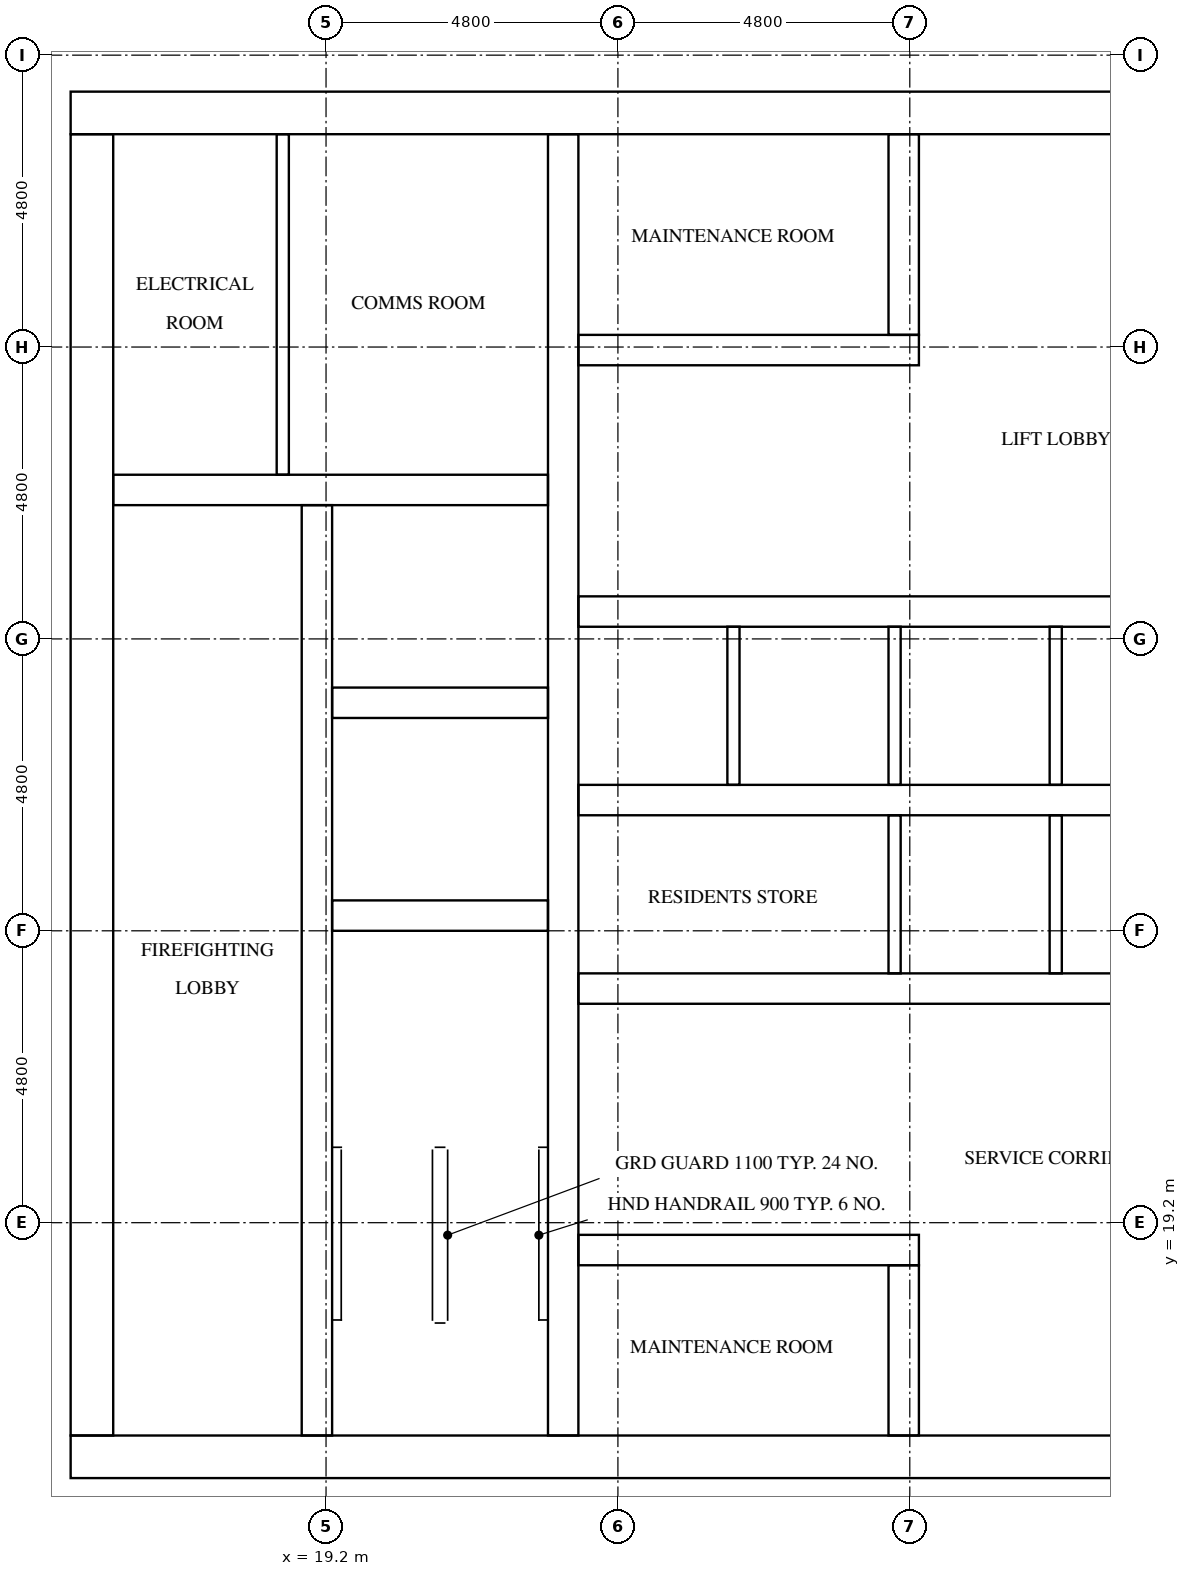
"""IFC4 building model, lengths in metres.
Left out: names, types, materials, properties, quantities, classifications, styles, units other than length and angle.
Written with IfcOpenShell. Run it as: python <this file> out.ifc"""

import sys

from ifc_helpers import new_model, si_unit, direction, frame, frame_2d, origin, place, context, subcontext, project, spatial, rectangle, extrude, element, fill, save


model = new_model("IFC4")
c1 = context("Model", 3, precision=1e-05, world=origin(), true_north=direction((0.0, 1.0)))
c2 = subcontext(c1, "Body", "Model", "MODEL_VIEW")
j1 = project(units=[si_unit("LENGTHUNIT", "METRE"), si_unit("PLANEANGLEUNIT", "RADIAN")], contexts=[c1])
p1 = place(None, origin())
s1 = spatial("IfcSite", under=j1, at=p1, CompositionType="ELEMENT")
p2 = place(p1, origin())
s2 = spatial("IfcBuilding", under=s1, at=p2, CompositionType="ELEMENT")
p3 = place(p2, frame((0.0, 0.0, 219.3)))
s3 = spatial("IfcBuildingStorey", under=s2, at=p3, CompositionType="ELEMENT", Elevation=219.3)
p4 = place(p3, frame((15.0, 15.35, 0.0), z_axis=(0.0, 0.0, 1.0), x_axis=(1.0, 0.0, 0.0)))
e1 = element("IfcWall", 1, at=p4, inside=s3, PredefinedType="SHEAR", context=c2, shape_type="SweptSolid", body=[
    extrude(rectangle(XDim=32.4, YDim=0.7, at=frame_2d((16.2, 0.0))), origin(), (0.0, 0.0, 1.0), 3.2),
])
p5 = place(p4, frame((15.3, 0.0, 0.0)))
e2 = element("IfcOpeningElement", 2, at=p5, cuts=e1, PredefinedType="OPENING", context=c2, shape_type="SweptSolid", body=[
    extrude(rectangle(XDim=1.8, YDim=2.1, at=frame_2d((0.9, 1.05))), frame((0.0, 0.36, 0.0), z_axis=(0.0, -1.0, 0.0), x_axis=(1.0, 0.0, 0.0)), (0.0, 0.0, 1.0), 0.72),
])
p6 = place(p3, frame((15.0, 37.45, 0.0), z_axis=(0.0, 0.0, 1.0), x_axis=(1.0, 0.0, 0.0)))
e3 = element("IfcWall", 3, at=p6, inside=s3, PredefinedType="SHEAR", context=c2, shape_type="SweptSolid", body=[
    extrude(rectangle(XDim=32.4, YDim=0.7, at=frame_2d((16.2, 0.0))), origin(), (0.0, 0.0, 1.0), 3.2),
])
p7 = place(p6, frame((15.3, 0.0, 0.0)))
e4 = element("IfcOpeningElement", 4, at=p7, cuts=e3, PredefinedType="OPENING", context=c2, shape_type="SweptSolid", body=[
    extrude(rectangle(XDim=1.8, YDim=2.1, at=frame_2d((0.9, 1.05))), frame((0.0, 0.36, 0.0), z_axis=(0.0, -1.0, 0.0), x_axis=(1.0, 0.0, 0.0)), (0.0, 0.0, 1.0), 0.72),
])
p8 = place(p6, frame((1.544, 0.0, 0.0)))
e5 = element("IfcOpeningElement", 5, at=p8, cuts=e3, PredefinedType="OPENING", context=c2, shape_type="SweptSolid", body=[
    extrude(rectangle(XDim=1.0, YDim=2.1, at=frame_2d((0.5, 1.05))), frame((0.0, 0.36, 0.0), z_axis=(0.0, -1.0, 0.0), x_axis=(1.0, 0.0, 0.0)), (0.0, 0.0, 1.0), 0.72),
])
p9 = place(p6, frame((5.219, 0.0, 0.0)))
e6 = element("IfcOpeningElement", 6, at=p9, cuts=e3, PredefinedType="OPENING", context=c2, shape_type="SweptSolid", body=[
    extrude(rectangle(XDim=1.0, YDim=2.1, at=frame_2d((0.5, 1.05))), frame((0.0, 0.36, 0.0), z_axis=(0.0, -1.0, 0.0), x_axis=(1.0, 0.0, 0.0)), (0.0, 0.0, 1.0), 0.72),
])
p10 = place(p3, frame((15.35, 15.7, 0.0), z_axis=(0.0, 0.0, 1.0), x_axis=(0.0, 1.0, 0.0)))
e7 = element("IfcWall", 7, at=p10, inside=s3, PredefinedType="SHEAR", context=c2, shape_type="SweptSolid", body=[
    extrude(rectangle(XDim=21.4, YDim=0.7, at=frame_2d((10.7, 0.0))), origin(), (0.0, 0.0, 1.0), 3.2),
])
p11 = place(p10, frame((5.06, 0.0, 0.0)))
e8 = element("IfcOpeningElement", 8, at=p11, cuts=e7, PredefinedType="OPENING", context=c2, shape_type="SweptSolid", body=[
    extrude(rectangle(XDim=1.2, YDim=2.1, at=frame_2d((0.6, 1.05))), frame((0.0, 0.36, 0.0), z_axis=(0.0, -1.0, 0.0), x_axis=(1.0, 0.0, 0.0)), (0.0, 0.0, 1.0), 0.72),
])
p12 = place(p3, frame((19.05, 15.7, 0.0), z_axis=(0.0, 0.0, 1.0), x_axis=(0.0, 1.0, 0.0)))
e9 = element("IfcWall", 9, at=p12, inside=s3, PredefinedType="SHEAR", context=c2, shape_type="SweptSolid", body=[
    extrude(rectangle(XDim=15.3, YDim=0.5, at=frame_2d((7.65, 0.0))), origin(), (0.0, 0.0, 1.0), 3.2),
])
p13 = place(p12, frame((9.75, 0.0, 0.0)))
e10 = element("IfcOpeningElement", 10, at=p13, cuts=e9, PredefinedType="OPENING", context=c2, shape_type="SweptSolid", body=[
    extrude(rectangle(XDim=1.1, YDim=2.1, at=frame_2d((0.55, 1.05))), frame((0.0, 0.26, 0.0), z_axis=(0.0, -1.0, 0.0), x_axis=(1.0, 0.0, 0.0)), (0.0, 0.0, 1.0), 0.52),
])
p14 = place(p12, frame((13.25, 0.0, 0.0)))
e11 = element("IfcOpeningElement", 11, at=p14, cuts=e9, PredefinedType="OPENING", context=c2, shape_type="SweptSolid", body=[
    extrude(rectangle(XDim=1.1, YDim=2.1, at=frame_2d((0.55, 1.05))), frame((0.0, 0.26, 0.0), z_axis=(0.0, -1.0, 0.0), x_axis=(1.0, 0.0, 0.0)), (0.0, 0.0, 1.0), 0.52),
])
p15 = place(p12, frame((0.5, 0.0, 0.0)))
e12 = element("IfcOpeningElement", 12, at=p15, cuts=e9, PredefinedType="OPENING", context=c2, shape_type="SweptSolid", body=[
    extrude(rectangle(XDim=1.2, YDim=2.1, at=frame_2d((0.6, 1.05))), frame((0.0, 0.26, 0.0), z_axis=(0.0, -1.0, 0.0), x_axis=(1.0, 0.0, 0.0)), (0.0, 0.0, 1.0), 0.52),
])
p16 = place(p3, frame((23.1, 15.7, 0.0), z_axis=(0.0, 0.0, 1.0), x_axis=(0.0, 1.0, 0.0)))
e13 = element("IfcWall", 13, at=p16, inside=s3, PredefinedType="SHEAR", context=c2, shape_type="SweptSolid", body=[
    extrude(rectangle(XDim=21.4, YDim=0.5, at=frame_2d((10.7, 0.0))), origin(), (0.0, 0.0, 1.0), 3.2),
])
for number, where, z_axis, x_axis in (
    (14, (19.3, 24.25, 0.0), (0.0, 0.0, 1.0), (1.0, 0.0, 0.0)),
    (15, (19.3, 27.75, 0.0), (0.0, 0.0, 1.0), (1.0, 0.0, 0.0)),
):
    element("IfcWall", number, at=place(p3, frame(where, z_axis=z_axis, x_axis=x_axis)), inside=s3, PredefinedType="SHEAR", context=c2, shape_type="SweptSolid", body=[
        extrude(rectangle(XDim=3.55, YDim=0.5, at=frame_2d((1.775, 0.0))), origin(), (0.0, 0.0, 1.0), 3.2),
    ])
p17 = place(p3, frame((15.7, 31.25, 0.0), z_axis=(0.0, 0.0, 1.0), x_axis=(1.0, 0.0, 0.0)))
e16 = element("IfcWall", 16, at=p17, inside=s3, PredefinedType="SHEAR", context=c2, shape_type="SweptSolid", body=[
    extrude(rectangle(XDim=7.15, YDim=0.5, at=frame_2d((3.575, 0.0))), origin(), (0.0, 0.0, 1.0), 3.2),
])
p18 = place(p3, frame((23.35, 18.75, 0.0), z_axis=(0.0, 0.0, 1.0), x_axis=(1.0, 0.0, 0.0)))
e17 = element("IfcWall", 17, at=p18, inside=s3, PredefinedType="SHEAR", context=c2, shape_type="SweptSolid", body=[
    extrude(rectangle(XDim=5.6, YDim=0.5, at=frame_2d((2.8, 0.0))), origin(), (0.0, 0.0, 1.0), 3.2),
])
p19 = place(p18, frame((2.05, 0.0, 0.0)))
e18 = element("IfcOpeningElement", 18, at=p19, cuts=e17, PredefinedType="OPENING", context=c2, shape_type="SweptSolid", body=[
    extrude(rectangle(XDim=1.0, YDim=2.1, at=frame_2d((0.5, 1.05))), frame((0.0, 0.26, 0.0), z_axis=(0.0, -1.0, 0.0), x_axis=(1.0, 0.0, 0.0)), (0.0, 0.0, 1.0), 0.52),
])
p20 = place(p3, frame((23.35, 23.05, 0.0), z_axis=(0.0, 0.0, 1.0), x_axis=(1.0, 0.0, 0.0)))
e19 = element("IfcWall", 19, at=p20, inside=s3, PredefinedType="SHEAR", context=c2, shape_type="SweptSolid", body=[
    extrude(rectangle(XDim=15.7, YDim=0.5, at=frame_2d((7.85, 0.0))), origin(), (0.0, 0.0, 1.0), 3.2),
])
p21 = place(p20, frame((2.05, 0.0, 0.0)))
e20 = element("IfcOpeningElement", 20, at=p21, cuts=e19, PredefinedType="OPENING", context=c2, shape_type="SweptSolid", body=[
    extrude(rectangle(XDim=1.0, YDim=2.1, at=frame_2d((0.5, 1.05))), frame((0.0, 0.26, 0.0), z_axis=(0.0, -1.0, 0.0), x_axis=(1.0, 0.0, 0.0)), (0.0, 0.0, 1.0), 0.52),
])
p22 = place(p20, frame((12.65, 0.0, 0.0)))
e21 = element("IfcOpeningElement", 21, at=p22, cuts=e19, PredefinedType="OPENING", context=c2, shape_type="SweptSolid", body=[
    extrude(rectangle(XDim=1.0, YDim=2.1, at=frame_2d((0.5, 1.05))), frame((0.0, 0.26, 0.0), z_axis=(0.0, -1.0, 0.0), x_axis=(1.0, 0.0, 0.0)), (0.0, 0.0, 1.0), 0.52),
])
p23 = place(p3, frame((23.35, 26.15, 0.0), z_axis=(0.0, 0.0, 1.0), x_axis=(1.0, 0.0, 0.0)))
e22 = element("IfcWall", 22, at=p23, inside=s3, PredefinedType="SHEAR", context=c2, shape_type="SweptSolid", body=[
    extrude(rectangle(XDim=15.7, YDim=0.5, at=frame_2d((7.85, 0.0))), origin(), (0.0, 0.0, 1.0), 3.2),
])
p24 = place(p3, frame((23.35, 29.25, 0.0), z_axis=(0.0, 0.0, 1.0), x_axis=(1.0, 0.0, 0.0)))
e23 = element("IfcWall", 23, at=p24, inside=s3, PredefinedType="SHEAR", context=c2, shape_type="SweptSolid", body=[
    extrude(rectangle(XDim=15.7, YDim=0.5, at=frame_2d((7.85, 0.0))), origin(), (0.0, 0.0, 1.0), 3.2),
])
p25 = place(p24, frame((0.675, 0.0, 0.0)))
e24 = element("IfcOpeningElement", 24, at=p25, cuts=e23, PredefinedType="OPENING", context=c2, shape_type="SweptSolid", body=[
    extrude(rectangle(XDim=1.1, YDim=2.1, at=frame_2d((0.55, 1.05))), frame((0.0, 0.26, 0.0), z_axis=(0.0, -1.0, 0.0), x_axis=(1.0, 0.0, 0.0)), (0.0, 0.0, 1.0), 0.52),
])
p26 = place(p24, frame((3.325, 0.0, 0.0)))
e25 = element("IfcOpeningElement", 25, at=p26, cuts=e23, PredefinedType="OPENING", context=c2, shape_type="SweptSolid", body=[
    extrude(rectangle(XDim=1.1, YDim=2.1, at=frame_2d((0.55, 1.05))), frame((0.0, 0.26, 0.0), z_axis=(0.0, -1.0, 0.0), x_axis=(1.0, 0.0, 0.0)), (0.0, 0.0, 1.0), 0.52),
])
p27 = place(p24, frame((5.975, 0.0, 0.0)))
e26 = element("IfcOpeningElement", 26, at=p27, cuts=e23, PredefinedType="OPENING", context=c2, shape_type="SweptSolid", body=[
    extrude(rectangle(XDim=1.1, YDim=2.1, at=frame_2d((0.55, 1.05))), frame((0.0, 0.26, 0.0), z_axis=(0.0, -1.0, 0.0), x_axis=(1.0, 0.0, 0.0)), (0.0, 0.0, 1.0), 0.52),
])
p28 = place(p24, frame((8.625, 0.0, 0.0)))
e27 = element("IfcOpeningElement", 27, at=p28, cuts=e23, PredefinedType="OPENING", context=c2, shape_type="SweptSolid", body=[
    extrude(rectangle(XDim=1.1, YDim=2.1, at=frame_2d((0.55, 1.05))), frame((0.0, 0.26, 0.0), z_axis=(0.0, -1.0, 0.0), x_axis=(1.0, 0.0, 0.0)), (0.0, 0.0, 1.0), 0.52),
])
p29 = place(p24, frame((11.275, 0.0, 0.0)))
e28 = element("IfcOpeningElement", 28, at=p29, cuts=e23, PredefinedType="OPENING", context=c2, shape_type="SweptSolid", body=[
    extrude(rectangle(XDim=1.1, YDim=2.1, at=frame_2d((0.55, 1.05))), frame((0.0, 0.26, 0.0), z_axis=(0.0, -1.0, 0.0), x_axis=(1.0, 0.0, 0.0)), (0.0, 0.0, 1.0), 0.52),
])
p30 = place(p24, frame((13.925, 0.0, 0.0)))
e29 = element("IfcOpeningElement", 29, at=p30, cuts=e23, PredefinedType="OPENING", context=c2, shape_type="SweptSolid", body=[
    extrude(rectangle(XDim=1.1, YDim=2.1, at=frame_2d((0.55, 1.05))), frame((0.0, 0.26, 0.0), z_axis=(0.0, -1.0, 0.0), x_axis=(1.0, 0.0, 0.0)), (0.0, 0.0, 1.0), 0.52),
])
p31 = place(p3, frame((23.35, 33.55, 0.0), z_axis=(0.0, 0.0, 1.0), x_axis=(1.0, 0.0, 0.0)))
e30 = element("IfcWall", 30, at=p31, inside=s3, PredefinedType="SHEAR", context=c2, shape_type="SweptSolid", body=[
    extrude(rectangle(XDim=5.6, YDim=0.5, at=frame_2d((2.8, 0.0))), origin(), (0.0, 0.0, 1.0), 3.2),
])
p32 = place(p31, frame((2.05, 0.0, 0.0)))
e31 = element("IfcOpeningElement", 31, at=p32, cuts=e30, PredefinedType="OPENING", context=c2, shape_type="SweptSolid", body=[
    extrude(rectangle(XDim=1.0, YDim=2.1, at=frame_2d((0.5, 1.05))), frame((0.0, 0.26, 0.0), z_axis=(0.0, -1.0, 0.0), x_axis=(1.0, 0.0, 0.0)), (0.0, 0.0, 1.0), 0.52),
])
p33 = place(p3, frame((28.7, 15.7, 0.0), z_axis=(0.0, 0.0, 1.0), x_axis=(0.0, 1.0, 0.0)))
e32 = element("IfcWall", 32, at=p33, inside=s3, PredefinedType="SHEAR", context=c2, shape_type="SweptSolid", body=[
    extrude(rectangle(XDim=2.8, YDim=0.5, at=frame_2d((1.4, 0.0))), origin(), (0.0, 0.0, 1.0), 3.2),
])
p34 = place(p3, frame((28.7, 33.8, 0.0), z_axis=(0.0, 0.0, 1.0), x_axis=(0.0, 1.0, 0.0)))
e33 = element("IfcWall", 33, at=p34, inside=s3, PredefinedType="SHEAR", context=c2, shape_type="SweptSolid", body=[
    extrude(rectangle(XDim=3.3, YDim=0.5, at=frame_2d((1.65, 0.0))), origin(), (0.0, 0.0, 1.0), 3.2),
])
p35 = place(p3, frame((25.9, 26.4, 0.0), z_axis=(0.0, 0.0, 1.0), x_axis=(0.0, 1.0, 0.0)))
e34 = element("IfcWall", 34, at=p35, inside=s3, PredefinedType="SOLIDWALL", context=c2, shape_type="SweptSolid", body=[
    extrude(rectangle(XDim=2.6, YDim=0.2, at=frame_2d((1.3, 0.0))), origin(), (0.0, 0.0, 1.0), 3.2),
])
p36 = place(p3, frame((28.55, 23.3, 0.0), z_axis=(0.0, 0.0, 1.0), x_axis=(0.0, 1.0, 0.0)))
e35 = element("IfcWall", 35, at=p36, inside=s3, PredefinedType="SOLIDWALL", context=c2, shape_type="SweptSolid", body=[
    extrude(rectangle(XDim=2.6, YDim=0.2, at=frame_2d((1.3, 0.0))), origin(), (0.0, 0.0, 1.0), 3.2),
])
p37 = place(p3, frame((28.55, 26.4, 0.0), z_axis=(0.0, 0.0, 1.0), x_axis=(0.0, 1.0, 0.0)))
e36 = element("IfcWall", 36, at=p37, inside=s3, PredefinedType="SOLIDWALL", context=c2, shape_type="SweptSolid", body=[
    extrude(rectangle(XDim=2.6, YDim=0.2, at=frame_2d((1.3, 0.0))), origin(), (0.0, 0.0, 1.0), 3.2),
])
p38 = place(p3, frame((31.2, 23.3, 0.0), z_axis=(0.0, 0.0, 1.0), x_axis=(0.0, 1.0, 0.0)))
e37 = element("IfcWall", 37, at=p38, inside=s3, PredefinedType="SOLIDWALL", context=c2, shape_type="SweptSolid", body=[
    extrude(rectangle(XDim=2.6, YDim=0.2, at=frame_2d((1.3, 0.0))), origin(), (0.0, 0.0, 1.0), 3.2),
])
p39 = place(p3, frame((31.2, 26.4, 0.0), z_axis=(0.0, 0.0, 1.0), x_axis=(0.0, 1.0, 0.0)))
e38 = element("IfcWall", 38, at=p39, inside=s3, PredefinedType="SOLIDWALL", context=c2, shape_type="SweptSolid", body=[
    extrude(rectangle(XDim=2.6, YDim=0.2, at=frame_2d((1.3, 0.0))), origin(), (0.0, 0.0, 1.0), 3.2),
])
p40 = place(p3, frame((18.489, 31.5, 0.0), z_axis=(0.0, 0.0, 1.0), x_axis=(0.0, 1.0, 0.0)))
e39 = element("IfcWall", 39, at=p40, inside=s3, PredefinedType="PARTITIONING", context=c2, shape_type="SweptSolid", body=[
    extrude(rectangle(XDim=5.6, YDim=0.2, at=frame_2d((2.8, 0.0))), origin(), (0.0, 0.0, 1.0), 3.2),
])
p41 = place(p25, origin())
e40 = element("IfcDoor", 40, at=p41, inside=s3, OperationType="DOUBLE_DOOR_SLIDING", PredefinedType="DOOR", context=c2, shape_type="SweptSolid", body=[
    extrude(rectangle(XDim=1.1, YDim=2.1, at=frame_2d((0.55, 1.05))), frame((0.0, 0.025, 0.0), z_axis=(0.0, -1.0, 0.0), x_axis=(1.0, 0.0, 0.0)), (0.0, 0.0, 1.0), 0.05),
])
fill(e24, e40)
p42 = place(p26, origin())
e41 = element("IfcDoor", 41, at=p42, inside=s3, OperationType="DOUBLE_DOOR_SLIDING", PredefinedType="DOOR", context=c2, shape_type="SweptSolid", body=[
    extrude(rectangle(XDim=1.1, YDim=2.1, at=frame_2d((0.55, 1.05))), frame((0.0, 0.025, 0.0), z_axis=(0.0, -1.0, 0.0), x_axis=(1.0, 0.0, 0.0)), (0.0, 0.0, 1.0), 0.05),
])
fill(e25, e41)
p43 = place(p27, origin())
e42 = element("IfcDoor", 42, at=p43, inside=s3, OperationType="DOUBLE_DOOR_SLIDING", PredefinedType="DOOR", context=c2, shape_type="SweptSolid", body=[
    extrude(rectangle(XDim=1.1, YDim=2.1, at=frame_2d((0.55, 1.05))), frame((0.0, 0.025, 0.0), z_axis=(0.0, -1.0, 0.0), x_axis=(1.0, 0.0, 0.0)), (0.0, 0.0, 1.0), 0.05),
])
fill(e26, e42)
p44 = place(p28, origin())
e43 = element("IfcDoor", 43, at=p44, inside=s3, OperationType="DOUBLE_DOOR_SLIDING", PredefinedType="DOOR", context=c2, shape_type="SweptSolid", body=[
    extrude(rectangle(XDim=1.1, YDim=2.1, at=frame_2d((0.55, 1.05))), frame((0.0, 0.025, 0.0), z_axis=(0.0, -1.0, 0.0), x_axis=(1.0, 0.0, 0.0)), (0.0, 0.0, 1.0), 0.05),
])
fill(e27, e43)
p45 = place(p13, origin())
e44 = element("IfcDoor", 44, at=p45, inside=s3, OperationType="DOUBLE_DOOR_SLIDING", PredefinedType="DOOR", context=c2, shape_type="SweptSolid", body=[
    extrude(rectangle(XDim=1.1, YDim=2.1, at=frame_2d((0.55, 1.05))), frame((0.0, 0.025, 0.0), z_axis=(0.0, -1.0, 0.0), x_axis=(1.0, 0.0, 0.0)), (0.0, 0.0, 1.0), 0.05),
])
fill(e10, e44)
p46 = place(p14, origin())
e45 = element("IfcDoor", 45, at=p46, inside=s3, OperationType="DOUBLE_DOOR_SLIDING", PredefinedType="DOOR", context=c2, shape_type="SweptSolid", body=[
    extrude(rectangle(XDim=1.1, YDim=2.1, at=frame_2d((0.55, 1.05))), frame((0.0, 0.025, 0.0), z_axis=(0.0, -1.0, 0.0), x_axis=(1.0, 0.0, 0.0)), (0.0, 0.0, 1.0), 0.05),
])
fill(e11, e45)
p47 = place(p15, frame((1.2, 0.0, 0.0), z_axis=(0.0, 0.0, 1.0), x_axis=(-1.0, 0.0, 0.0)))
e46 = element("IfcDoor", 46, at=p47, inside=s3, OperationType="SINGLE_SWING_LEFT", PredefinedType="DOOR", context=c2, shape_type="SweptSolid", body=[
    extrude(rectangle(XDim=1.2, YDim=2.1, at=frame_2d((0.6, 1.05))), frame((0.0, 0.025, 0.0), z_axis=(0.0, -1.0, 0.0), x_axis=(1.0, 0.0, 0.0)), (0.0, 0.0, 1.0), 0.05),
])
fill(e12, e46)
p48 = place(p5, frame((1.8, 0.0, 0.0), z_axis=(0.0, 0.0, 1.0), x_axis=(-1.0, 0.0, 0.0)))
e47 = element("IfcDoor", 47, at=p48, inside=s3, OperationType="DOUBLE_DOOR_SINGLE_SWING", PredefinedType="DOOR", context=c2, shape_type="SweptSolid", body=[
    extrude(rectangle(XDim=1.8, YDim=2.1, at=frame_2d((0.9, 1.05))), frame((0.0, 0.025, 0.0), z_axis=(0.0, -1.0, 0.0), x_axis=(1.0, 0.0, 0.0)), (0.0, 0.0, 1.0), 0.05),
])
fill(e2, e47)
p49 = place(p7, origin())
e48 = element("IfcDoor", 48, at=p49, inside=s3, OperationType="DOUBLE_DOOR_SINGLE_SWING", PredefinedType="DOOR", context=c2, shape_type="SweptSolid", body=[
    extrude(rectangle(XDim=1.8, YDim=2.1, at=frame_2d((0.9, 1.05))), frame((0.0, 0.025, 0.0), z_axis=(0.0, -1.0, 0.0), x_axis=(1.0, 0.0, 0.0)), (0.0, 0.0, 1.0), 0.05),
])
fill(e4, e48)
p50 = place(p11, frame((1.2, 0.0, 0.0), z_axis=(0.0, 0.0, 1.0), x_axis=(-1.0, 0.0, 0.0)))
e49 = element("IfcDoor", 49, at=p50, inside=s3, OperationType="SINGLE_SWING_RIGHT", PredefinedType="DOOR", context=c2, shape_type="SweptSolid", body=[
    extrude(rectangle(XDim=1.2, YDim=2.1, at=frame_2d((0.6, 1.05))), frame((0.0, 0.025, 0.0), z_axis=(0.0, -1.0, 0.0), x_axis=(1.0, 0.0, 0.0)), (0.0, 0.0, 1.0), 0.05),
])
fill(e8, e49)
p51 = place(p8, origin())
e50 = element("IfcDoor", 50, at=p51, inside=s3, OperationType="SINGLE_SWING_RIGHT", PredefinedType="DOOR", context=c2, shape_type="SweptSolid", body=[
    extrude(rectangle(XDim=1.0, YDim=2.1, at=frame_2d((0.5, 1.05))), frame((0.0, 0.025, 0.0), z_axis=(0.0, -1.0, 0.0), x_axis=(1.0, 0.0, 0.0)), (0.0, 0.0, 1.0), 0.05),
])
fill(e5, e50)
p52 = place(p9, origin())
e51 = element("IfcDoor", 51, at=p52, inside=s3, OperationType="SINGLE_SWING_LEFT", PredefinedType="DOOR", context=c2, shape_type="SweptSolid", body=[
    extrude(rectangle(XDim=1.0, YDim=2.1, at=frame_2d((0.5, 1.05))), frame((0.0, 0.025, 0.0), z_axis=(0.0, -1.0, 0.0), x_axis=(1.0, 0.0, 0.0)), (0.0, 0.0, 1.0), 0.05),
])
fill(e6, e51)
p53 = place(p21, frame((1.0, 0.0, 0.0), z_axis=(0.0, 0.0, 1.0), x_axis=(-1.0, 0.0, 0.0)))
e52 = element("IfcDoor", 52, at=p53, inside=s3, OperationType="SINGLE_SWING_RIGHT", PredefinedType="DOOR", context=c2, shape_type="SweptSolid", body=[
    extrude(rectangle(XDim=1.0, YDim=2.1, at=frame_2d((0.5, 1.05))), frame((0.0, 0.025, 0.0), z_axis=(0.0, -1.0, 0.0), x_axis=(1.0, 0.0, 0.0)), (0.0, 0.0, 1.0), 0.05),
])
fill(e20, e52)
p54 = place(p19, origin())
e53 = element("IfcDoor", 53, at=p54, inside=s3, OperationType="SINGLE_SWING_RIGHT", PredefinedType="DOOR", context=c2, shape_type="SweptSolid", body=[
    extrude(rectangle(XDim=1.0, YDim=2.1, at=frame_2d((0.5, 1.05))), frame((0.0, 0.025, 0.0), z_axis=(0.0, -1.0, 0.0), x_axis=(1.0, 0.0, 0.0)), (0.0, 0.0, 1.0), 0.05),
])
fill(e18, e53)
p55 = place(p32, frame((1.0, 0.0, 0.0), z_axis=(0.0, 0.0, 1.0), x_axis=(-1.0, 0.0, 0.0)))
e54 = element("IfcDoor", 54, at=p55, inside=s3, OperationType="SINGLE_SWING_RIGHT", PredefinedType="DOOR", context=c2, shape_type="SweptSolid", body=[
    extrude(rectangle(XDim=1.0, YDim=2.1, at=frame_2d((0.5, 1.05))), frame((0.0, 0.025, 0.0), z_axis=(0.0, -1.0, 0.0), x_axis=(1.0, 0.0, 0.0)), (0.0, 0.0, 1.0), 0.05),
])
fill(e31, e54)
save(model, sys.argv[1])
